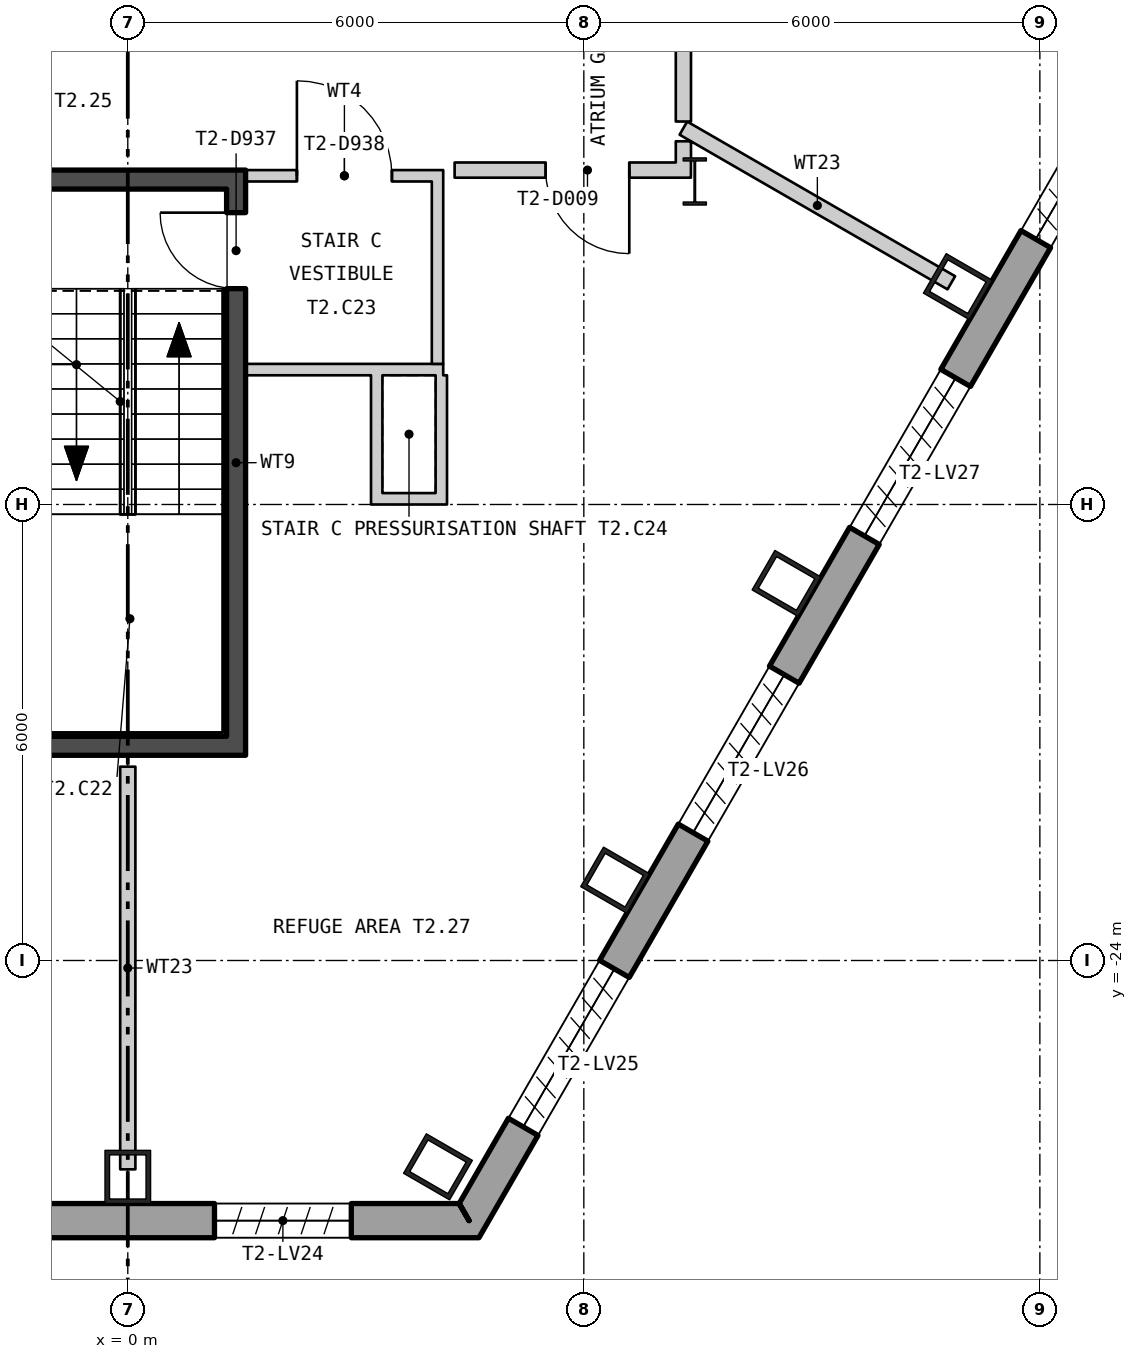
"""IFC4 building model, lengths in metres.
Left out: names, types, materials, properties, quantities, classifications, styles, units other than length and angle.
Written with IfcOpenShell. Run it as: python <this file> out.ifc"""

import sys

from ifc_helpers import new_model, si_unit, direction, frame, frame_2d, origin, origin_2d, place, context, subcontext, project, spatial, polyline, rectangle, hollow_rectangle, i_section, outline, extrude, element, fill, save


model = new_model("IFC4")
c1 = context("Model", 3, precision=1e-05, world=origin(), true_north=direction((0.0, 1.0)))
c2 = subcontext(c1, "Body", "Model", "MODEL_VIEW")
j1 = project(units=[si_unit("LENGTHUNIT", "METRE"), si_unit("PLANEANGLEUNIT", "RADIAN")], contexts=[c1])
p1 = place(None, origin())
s1 = spatial("IfcSite", under=j1, at=p1, CompositionType="ELEMENT")
p2 = place(p1, origin())
s2 = spatial("IfcBuilding", under=s1, at=p2, CompositionType="ELEMENT")
p3 = place(p2, frame((0.0, 0.0, 133.8)))
s3 = spatial("IfcBuildingStorey", under=s2, at=p3, CompositionType="ELEMENT", Elevation=133.8)
for number, where, z_axis, x_axis in (
    (1, (0.0, -26.848, 0.0), (0.0, 0.0, 1.0), (1.0, 0.0, 0.0)),
    (2, (4.081, -26.715, 0.0), (0.0, 0.0, 1.0), (0.5, 0.866, 0.0)),
    (3, (6.412, -22.943, 0.0), (0.0, 0.0, 1.0), (0.5, 0.866, 0.0)),
    (4, (8.667, -19.039, 0.0), (0.0, 0.0, 1.0), (0.5, 0.866, 0.0)),
    (5, (10.921, -15.134, 0.0), (0.0, 0.0, 1.0), (0.5, 0.866, 0.0)),
):
    element("IfcColumn", number, at=place(p3, frame(where, z_axis=z_axis, x_axis=x_axis)), inside=s3, PredefinedType="COLUMN", context=c2, shape_type="SweptSolid", body=[
        extrude(hollow_rectangle(XDim=0.6, YDim=0.7, WallThickness=0.06, at=origin_2d()), origin(), (0.0, 0.0, 1.0), 6.0),
    ])
p4 = place(p3, frame((7.46, -13.75, 0.0), z_axis=(0.0, 0.0, 1.0), x_axis=(1.0, 0.0, 0.0)))
e6 = element("IfcColumn", 6, at=p4, inside=s3, PredefinedType="COLUMN", context=c2, shape_type="SweptSolid", body=[
    extrude(i_section(OverallWidth=0.305, OverallDepth=0.62, WebThickness=0.021, FlangeThickness=0.04, at=origin_2d()), origin(), (0.0, 0.0, 1.0), 6.0),
])
p5 = place(p3, frame((-4.49, -27.423, -0.18), z_axis=(0.0, 0.0, 1.0), x_axis=(1.0, 0.0, 0.0)))
e7 = element("IfcWall", 7, at=p5, inside=s3, PredefinedType="SOLIDWALL", context=c2, shape_type="SweptSolid", body=[
    extrude(outline(polyline([(-0.13, -0.225), (9.11, -0.225), (8.85, 0.225), (0.13, 0.225), (-0.13, -0.225)])), origin(), (0.0, 0.0, 1.0), 6.0),
])
p6 = place(p5, frame((1.549, 0.0, 1.38)))
e8 = element("IfcOpeningElement", 8, at=p6, cuts=e7, PredefinedType="OPENING", context=c2, shape_type="SweptSolid", body=[
    extrude(rectangle(XDim=1.8, YDim=3.6, at=frame_2d((0.9, 1.8))), frame((0.0, 0.235, 0.0), z_axis=(0.0, -1.0, 0.0), x_axis=(1.0, 0.0, 0.0)), (0.0, 0.0, 1.0), 0.47),
])
p7 = place(p5, frame((5.631, 0.0, 1.38)))
e9 = element("IfcOpeningElement", 9, at=p7, cuts=e7, PredefinedType="OPENING", context=c2, shape_type="SweptSolid", body=[
    extrude(rectangle(XDim=1.8, YDim=3.6, at=frame_2d((0.9, 1.8))), frame((0.0, 0.235, 0.0), z_axis=(0.0, -1.0, 0.0), x_axis=(1.0, 0.0, 0.0)), (0.0, 0.0, 1.0), 0.47),
])
p8 = place(p3, frame((4.49, -27.423, -0.18), z_axis=(0.0, 0.0, 1.0), x_axis=(0.500000335318, 0.866025210188, 0.0)))
e10 = element("IfcWall", 10, at=p8, inside=s3, PredefinedType="SOLIDWALL", context=c2, shape_type="SweptSolid", body=[
    extrude(outline(polyline([(-0.13, -0.225), (45.88, -0.225), (45.62, 0.225), (0.13, 0.225), (-0.13, -0.225)])), origin(), (0.0, 0.0, 1.0), 6.0),
])
p9 = place(p8, frame((1.425, 0.0, 1.38)))
e11 = element("IfcOpeningElement", 11, at=p9, cuts=e10, PredefinedType="OPENING", context=c2, shape_type="SweptSolid", body=[
    extrude(rectangle(XDim=2.4, YDim=3.6, at=frame_2d((1.2, 1.8))), frame((0.0, 0.235, 0.0), z_axis=(0.0, -1.0, 0.0), x_axis=(1.0, 0.0, 0.0)), (0.0, 0.0, 1.0), 0.47),
])
p10 = place(p8, frame((5.895, 0.0, 1.38)))
e12 = element("IfcOpeningElement", 12, at=p10, cuts=e10, PredefinedType="OPENING", context=c2, shape_type="SweptSolid", body=[
    extrude(rectangle(XDim=2.4, YDim=3.6, at=frame_2d((1.2, 1.8))), frame((0.0, 0.235, 0.0), z_axis=(0.0, -1.0, 0.0), x_axis=(1.0, 0.0, 0.0)), (0.0, 0.0, 1.0), 0.47),
])
p11 = place(p8, frame((10.403, 0.0, 1.38)))
e13 = element("IfcOpeningElement", 13, at=p11, cuts=e10, PredefinedType="OPENING", context=c2, shape_type="SweptSolid", body=[
    extrude(rectangle(XDim=2.4, YDim=3.6, at=frame_2d((1.2, 1.8))), frame((0.0, 0.235, 0.0), z_axis=(0.0, -1.0, 0.0), x_axis=(1.0, 0.0, 0.0)), (0.0, 0.0, 1.0), 0.47),
])
p12 = place(p8, frame((14.912, 0.0, 1.38)))
e14 = element("IfcOpeningElement", 14, at=p12, cuts=e10, PredefinedType="OPENING", context=c2, shape_type="SweptSolid", body=[
    extrude(rectangle(XDim=2.4, YDim=3.6, at=frame_2d((1.2, 1.8))), frame((0.0, 0.235, 0.0), z_axis=(0.0, -1.0, 0.0), x_axis=(1.0, 0.0, 0.0)), (0.0, 0.0, 1.0), 0.47),
])
p13 = place(p8, frame((19.421, 0.0, 1.38)))
e15 = element("IfcOpeningElement", 15, at=p13, cuts=e10, PredefinedType="OPENING", context=c2, shape_type="SweptSolid", body=[
    extrude(rectangle(XDim=2.4, YDim=3.6, at=frame_2d((1.2, 1.8))), frame((0.0, 0.235, 0.0), z_axis=(0.0, -1.0, 0.0), x_axis=(1.0, 0.0, 0.0)), (0.0, 0.0, 1.0), 0.47),
])
p14 = place(p8, frame((23.929, 0.0, 1.38)))
e16 = element("IfcOpeningElement", 16, at=p14, cuts=e10, PredefinedType="OPENING", context=c2, shape_type="SweptSolid", body=[
    extrude(rectangle(XDim=2.4, YDim=3.6, at=frame_2d((1.2, 1.8))), frame((0.0, 0.235, 0.0), z_axis=(0.0, -1.0, 0.0), x_axis=(1.0, 0.0, 0.0)), (0.0, 0.0, 1.0), 0.47),
])
p15 = place(p8, frame((28.438, 0.0, 1.38)))
e17 = element("IfcOpeningElement", 17, at=p15, cuts=e10, PredefinedType="OPENING", context=c2, shape_type="SweptSolid", body=[
    extrude(rectangle(XDim=2.4, YDim=3.6, at=frame_2d((1.2, 1.8))), frame((0.0, 0.235, 0.0), z_axis=(0.0, -1.0, 0.0), x_axis=(1.0, 0.0, 0.0)), (0.0, 0.0, 1.0), 0.47),
])
p16 = place(p8, frame((32.947, 0.0, 1.38)))
e18 = element("IfcOpeningElement", 18, at=p16, cuts=e10, PredefinedType="OPENING", context=c2, shape_type="SweptSolid", body=[
    extrude(rectangle(XDim=2.4, YDim=3.6, at=frame_2d((1.2, 1.8))), frame((0.0, 0.235, 0.0), z_axis=(0.0, -1.0, 0.0), x_axis=(1.0, 0.0, 0.0)), (0.0, 0.0, 1.0), 0.47),
])
p17 = place(p8, frame((37.455, 0.0, 1.38)))
e19 = element("IfcOpeningElement", 19, at=p17, cuts=e10, PredefinedType="OPENING", context=c2, shape_type="SweptSolid", body=[
    extrude(rectangle(XDim=2.4, YDim=3.6, at=frame_2d((1.2, 1.8))), frame((0.0, 0.235, 0.0), z_axis=(0.0, -1.0, 0.0), x_axis=(1.0, 0.0, 0.0)), (0.0, 0.0, 1.0), 0.47),
])
p18 = place(p8, frame((41.925, 0.0, 1.38)))
e20 = element("IfcOpeningElement", 20, at=p18, cuts=e10, PredefinedType="OPENING", context=c2, shape_type="SweptSolid", body=[
    extrude(rectangle(XDim=2.4, YDim=3.6, at=frame_2d((1.2, 1.8))), frame((0.0, 0.235, 0.0), z_axis=(0.0, -1.0, 0.0), x_axis=(1.0, 0.0, 0.0)), (0.0, 0.0, 1.0), 0.47),
])
p19 = place(p3, frame((1.425, -21.05, 0.0), z_axis=(0.0, 0.0, 1.0), x_axis=(0.0, 1.0, 0.0)))
e21 = element("IfcWall", 21, at=p19, inside=s3, PredefinedType="SHEAR", context=c2, shape_type="SweptSolid", body=[
    extrude(rectangle(XDim=7.2, YDim=0.25, at=frame_2d((3.6, 0.0))), origin(), (0.0, 0.0, 1.0), 5.8),
])
p20 = place(p19, frame((5.89, 0.0, 0.0)))
e22 = element("IfcOpeningElement", 22, at=p20, cuts=e21, PredefinedType="OPENING", context=c2, shape_type="SweptSolid", body=[
    extrude(rectangle(XDim=1.0, YDim=2.1, at=frame_2d((0.5, 1.05))), frame((0.0, 0.135, 0.0), z_axis=(0.0, -1.0, 0.0), x_axis=(1.0, 0.0, 0.0)), (0.0, 0.0, 1.0), 0.27),
])
for number, where, z_axis, x_axis in (
    (23, (-1.55, -21.175, 0.0), (0.0, 0.0, 1.0), (1.0, 0.0, 0.0)),
    (24, (-1.55, -13.725, 0.0), (0.0, 0.0, 1.0), (1.0, 0.0, 0.0)),
):
    element("IfcWall", number, at=place(p3, frame(where, z_axis=z_axis, x_axis=x_axis)), inside=s3, PredefinedType="SHEAR", context=c2, shape_type="SweptSolid", body=[
        extrude(rectangle(XDim=3.1, YDim=0.25, at=frame_2d((1.55, 0.0))), origin(), (0.0, 0.0, 1.0), 5.8),
    ])
p21 = place(p3, frame((1.55, -16.225, 0.0), z_axis=(0.0, 0.0, 1.0), x_axis=(1.0, 0.0, 0.0)))
e25 = element("IfcWall", 25, at=p21, inside=s3, PredefinedType="PARTITIONING", context=c2, shape_type="SweptSolid", body=[
    extrude(rectangle(XDim=2.6, YDim=0.15, at=frame_2d((1.3, 0.0))), origin(), (0.0, 0.0, 1.0), 5.8),
])
p22 = place(p3, frame((4.075, -16.15, 0.0), z_axis=(0.0, 0.0, 1.0), x_axis=(0.0, 1.0, 0.0)))
e26 = element("IfcWall", 26, at=p22, inside=s3, PredefinedType="PARTITIONING", context=c2, shape_type="SweptSolid", body=[
    extrude(rectangle(XDim=2.4, YDim=0.15, at=frame_2d((1.2, 0.0))), origin(), (0.0, 0.0, 1.0), 5.8),
])
p23 = place(p3, frame((1.55, -13.675, 0.0), z_axis=(0.0, 0.0, 1.0), x_axis=(1.0, 0.0, 0.0)))
e27 = element("IfcWall", 27, at=p23, inside=s3, PredefinedType="PARTITIONING", context=c2, shape_type="SweptSolid", body=[
    extrude(rectangle(XDim=2.6, YDim=0.15, at=frame_2d((1.3, 0.0))), origin(), (0.0, 0.0, 1.0), 4.89),
])
p24 = place(p23, frame((0.675, 0.0, 0.0)))
e28 = element("IfcOpeningElement", 28, at=p24, cuts=e27, PredefinedType="OPENING", context=c2, shape_type="SweptSolid", body=[
    extrude(rectangle(XDim=1.25, YDim=2.1, at=frame_2d((0.625, 1.05))), frame((0.0, 0.085, 0.0), z_axis=(0.0, -1.0, 0.0), x_axis=(1.0, 0.0, 0.0)), (0.0, 0.0, 1.0), 0.17),
])
p25 = place(p3, frame((3.275, -18.0, 0.0), z_axis=(0.0, 0.0, 1.0), x_axis=(0.0, 1.0, 0.0)))
e29 = element("IfcWall", 29, at=p25, inside=s3, PredefinedType="PARTITIONING", context=c2, shape_type="SweptSolid", body=[
    extrude(rectangle(XDim=1.7, YDim=0.15, at=frame_2d((0.85, 0.0))), origin(), (0.0, 0.0, 1.0), 5.11),
])
p26 = place(p3, frame((3.35, -17.925, 0.0), z_axis=(0.0, 0.0, 1.0), x_axis=(1.0, 0.0, 0.0)))
e30 = element("IfcWall", 30, at=p26, inside=s3, PredefinedType="PARTITIONING", context=c2, shape_type="SweptSolid", body=[
    extrude(rectangle(XDim=0.7, YDim=0.15, at=frame_2d((0.35, 0.0))), origin(), (0.0, 0.0, 1.0), 5.8),
])
p27 = place(p3, frame((4.125, -18.0, 0.0), z_axis=(0.0, 0.0, 1.0), x_axis=(0.0, 1.0, 0.0)))
e31 = element("IfcWall", 31, at=p27, inside=s3, PredefinedType="PARTITIONING", context=c2, shape_type="SweptSolid", body=[
    extrude(rectangle(XDim=1.7, YDim=0.15, at=frame_2d((0.85, 0.0))), origin(), (0.0, 0.0, 1.0), 5.8),
])
p28 = place(p3, frame((0.0, -26.748, 0.0), z_axis=(0.0, 0.0, 1.0), x_axis=(0.0, 1.0, 0.0)))
e32 = element("IfcWall", 32, at=p28, inside=s3, PredefinedType="PARTITIONING", context=c2, shape_type="SweptSolid", body=[
    extrude(rectangle(XDim=5.298, YDim=0.2, at=frame_2d((2.649, 0.0))), origin(), (0.0, 0.0, 1.0), 5.25),
])
p29 = place(p3, frame((4.3, -13.6, 0.0), z_axis=(0.0, 0.0, 1.0), x_axis=(1.0, 0.0, 0.0)))
e33 = element("IfcWall", 33, at=p29, inside=s3, PredefinedType="PARTITIONING", context=c2, shape_type="SweptSolid", body=[
    extrude(rectangle(XDim=3.109, YDim=0.2, at=frame_2d((1.554, 0.0))), origin(), (0.0, 0.0, 1.0), 4.89),
])
p30 = place(p29, frame((1.198, 0.0, 0.0)))
e34 = element("IfcOpeningElement", 34, at=p30, cuts=e33, PredefinedType="OPENING", context=c2, shape_type="SweptSolid", body=[
    extrude(rectangle(XDim=1.1, YDim=2.1, at=frame_2d((0.55, 1.05))), frame((0.0, 0.11, 0.0), z_axis=(0.0, -1.0, 0.0), x_axis=(1.0, 0.0, 0.0)), (0.0, 0.0, 1.0), 0.22),
])
p31 = place(p3, frame((7.31, -13.5, 0.0), z_axis=(0.0, 0.0, 1.0), x_axis=(0.0, 1.0, 0.0)))
e35 = element("IfcWall", 35, at=p31, inside=s3, PredefinedType="PARTITIONING", context=c2, shape_type="SweptSolid", body=[
    extrude(rectangle(XDim=0.279, YDim=0.2, at=frame_2d((0.14, 0.0))), origin(), (0.0, 0.0, 1.0), 5.8),
])
p32 = place(p3, frame((7.31, -13.048, 0.0), z_axis=(0.0, 0.0, 1.0), x_axis=(0.866042392862, -0.4999705729, 0.0)))
e36 = element("IfcWall", 36, at=p32, inside=s3, PredefinedType="PARTITIONING", context=c2, shape_type="SweptSolid", body=[
    extrude(rectangle(XDim=4.07, YDim=0.2, at=frame_2d((2.035, 0.0))), origin(), (0.0, 0.0, 1.0), 5.8),
])
p33 = place(p3, frame((7.31, -12.961, 0.0), z_axis=(0.0, 0.0, 1.0), x_axis=(0.0, 1.0, 0.0)))
e37 = element("IfcWall", 37, at=p33, inside=s3, PredefinedType="PARTITIONING", context=c2, shape_type="SweptSolid", body=[
    extrude(rectangle(XDim=9.761, YDim=0.2, at=frame_2d((4.88, 0.0))), origin(), (0.0, 0.0, 1.0), 5.21),
])
p34 = place(p33, frame((3.111, 0.0, 0.0)))
e38 = element("IfcOpeningElement", 38, at=p34, cuts=e37, PredefinedType="OPENING", context=c2, shape_type="SweptSolid", body=[
    extrude(rectangle(XDim=1.1, YDim=2.1, at=frame_2d((0.55, 1.05))), frame((0.0, 0.11, 0.0), z_axis=(0.0, -1.0, 0.0), x_axis=(1.0, 0.0, 0.0)), (0.0, 0.0, 1.0), 0.22),
])
p35 = place(p20, origin())
e39 = element("IfcDoor", 39, at=p35, inside=s3, OperationType="SINGLE_SWING_LEFT", PredefinedType="DOOR", context=c2, shape_type="SweptSolid", body=[
    extrude(rectangle(XDim=1.0, YDim=2.1, at=frame_2d((0.5, 1.05))), frame((0.0, 0.025, 0.0), z_axis=(0.0, -1.0, 0.0), x_axis=(1.0, 0.0, 0.0)), (0.0, 0.0, 1.0), 0.05),
])
fill(e22, e39)
p36 = place(p24, origin())
e40 = element("IfcDoor", 40, at=p36, inside=s3, OperationType="SINGLE_SWING_RIGHT", PredefinedType="DOOR", context=c2, shape_type="SweptSolid", body=[
    extrude(rectangle(XDim=1.25, YDim=2.1, at=frame_2d((0.625, 1.05))), frame((0.0, 0.025, 0.0), z_axis=(0.0, -1.0, 0.0), x_axis=(1.0, 0.0, 0.0)), (0.0, 0.0, 1.0), 0.05),
])
fill(e28, e40)
p37 = place(p30, origin())
e41 = element("IfcDoor", 41, at=p37, inside=s3, OperationType="SINGLE_SWING_RIGHT", PredefinedType="DOOR", context=c2, shape_type="SweptSolid", body=[
    extrude(rectangle(XDim=1.1, YDim=2.1, at=frame_2d((0.55, 1.05))), frame((0.0, 0.025, 0.0), z_axis=(0.0, -1.0, 0.0), x_axis=(1.0, 0.0, 0.0)), (0.0, 0.0, 1.0), 0.05),
])
fill(e34, e41)
save(model, sys.argv[1])
